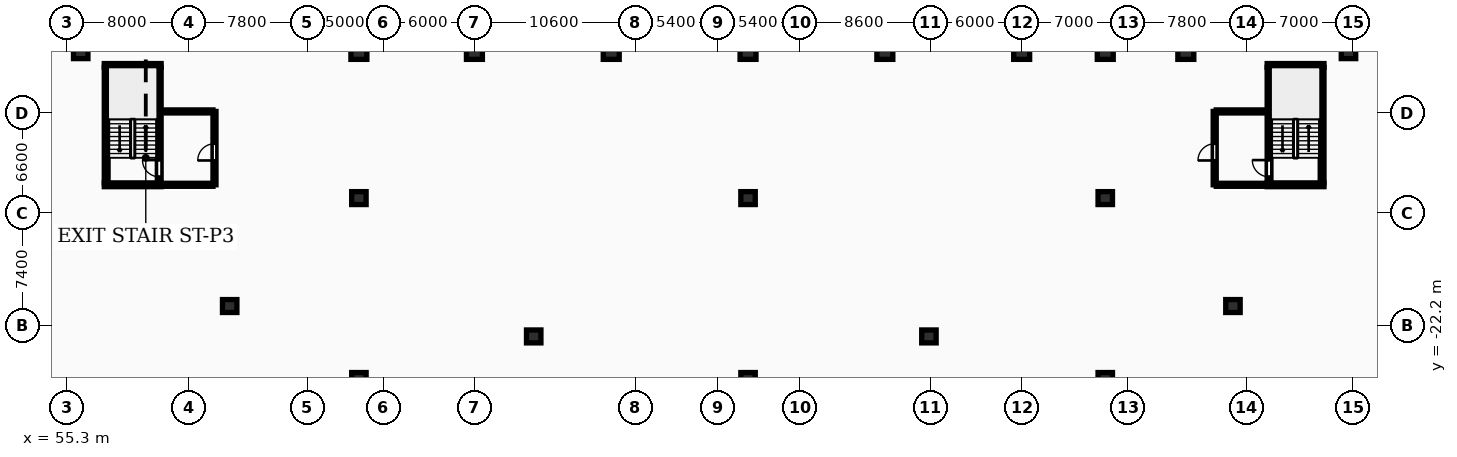
"""IFC4 building model, lengths in metres.
Left out: names, types, materials, properties, quantities, classifications, styles, units other than length and angle.
Written with IfcOpenShell. Run it as: python <this file> out.ifc"""

import sys

from ifc_helpers import new_model, si_unit, direction, frame, frame_2d, origin, origin_2d, place, context, subcontext, project, spatial, rectangle, extrude, element, fill, save


model = new_model("IFC4")
c1 = context("Model", 3, precision=1e-05, world=origin(), true_north=direction((0.0, 1.0)))
c2 = subcontext(c1, "Body", "Model", "MODEL_VIEW")
j1 = project(units=[si_unit("LENGTHUNIT", "METRE"), si_unit("PLANEANGLEUNIT", "RADIAN")], contexts=[c1])
p1 = place(None, origin())
s1 = spatial("IfcSite", under=j1, at=p1, CompositionType="ELEMENT")
p2 = place(p1, origin())
s2 = spatial("IfcBuilding", under=s1, at=p2, CompositionType="ELEMENT")
p3 = place(p2, frame((0.0, 0.0, -3.6)))
s3 = spatial("IfcBuildingStorey", under=s2, at=p3, CompositionType="ELEMENT", Elevation=-3.6)
for number, where, z_axis, x_axis in (
    (1, (74.5, -4.2, 0.0), (0.0, 0.0, 1.0), (1.0, 0.0, 0.0)),
    (2, (82.1, -4.2, 0.0), (0.0, 0.0, 1.0), (1.0, 0.0, 0.0)),
    (3, (91.1, -4.2, 0.0), (0.0, 0.0, 1.0), (1.0, 0.0, 0.0)),
    (4, (100.1, -4.2, 0.0), (0.0, 0.0, 1.0), (1.0, 0.0, 0.0)),
    (5, (109.1, -4.2, 0.0), (0.0, 0.0, 1.0), (1.0, 0.0, 0.0)),
    (6, (118.1, -4.2, 0.0), (0.0, 0.0, 1.0), (1.0, 0.0, 0.0)),
    (7, (123.6, -4.2, 0.0), (0.0, 0.0, 1.0), (1.0, 0.0, 0.0)),
    (8, (128.9, -4.2, 0.0), (0.0, 0.0, 1.0), (1.0, 0.0, 0.0)),
):
    element("IfcColumn", number, at=place(p3, frame(where, z_axis=z_axis, x_axis=x_axis)), inside=s3, PredefinedType="COLUMN", context=c2, shape_type="SweptSolid", body=[
        extrude(rectangle(XDim=1.05, YDim=0.95, at=origin_2d()), origin(), (0.0, 0.0, 1.0), 3.6),
    ])
for number, where, z_axis, x_axis in (
    (9, (56.2, -4.2, 0.0), (0.0, 0.0, 1.0), (1.0, 0.0, 0.0)),
    (10, (139.6, -4.2, 0.0), (0.0, 0.0, 1.0), (1.0, 0.0, 0.0)),
    (11, (74.5, -13.8, 0.0), (0.0, 0.0, 1.0), (1.0, 0.0, 0.0)),
    (12, (100.1, -13.8, 0.0), (0.0, 0.0, 1.0), (1.0, 0.0, 0.0)),
    (13, (123.6, -13.8, 0.0), (0.0, 0.0, 1.0), (1.0, 0.0, 0.0)),
    (14, (86.0, -22.9, 0.0), (0.0, 0.0, 1.0), (1.0, 0.0, 0.0)),
    (15, (112.0, -22.9, 0.0), (0.0, 0.0, 1.0), (1.0, 0.0, 0.0)),
    (16, (66.0, -20.9, 0.0), (0.0, 0.0, 1.0), (1.0, 0.0, 0.0)),
    (17, (132.0, -20.9, 0.0), (0.0, 0.0, 1.0), (1.0, 0.0, 0.0)),
    (18, (74.5, -25.7, 0.0), (0.0, 0.0, 1.0), (1.0, 0.0, 0.0)),
    (19, (100.1, -25.7, 0.0), (0.0, 0.0, 1.0), (1.0, 0.0, 0.0)),
    (20, (123.6, -25.7, 0.0), (0.0, 0.0, 1.0), (1.0, 0.0, 0.0)),
):
    element("IfcColumn", number, at=place(p3, frame(where, z_axis=z_axis, x_axis=x_axis)), inside=s3, PredefinedType="COLUMN", context=c2, shape_type="SweptSolid", body=[
        extrude(rectangle(XDim=0.95, YDim=0.85, at=origin_2d()), origin(), (0.0, 0.0, 1.0), 3.6),
    ])
p4 = place(p3, frame((57.875, -12.8, 0.0), z_axis=(0.0, 0.0, 1.0), x_axis=(0.0, 1.0, 0.0)))
e21 = element("IfcWall", 21, at=p4, inside=s3, PredefinedType="SHEAR", context=c2, shape_type="SweptSolid", body=[
    extrude(rectangle(XDim=7.6, YDim=0.25, at=frame_2d((3.8, 0.0))), origin(), (0.0, 0.0, 1.0), 3.6),
])
for number, where, z_axis, x_axis in (
    (22, (57.75, -12.925, 0.0), (0.0, 0.0, 1.0), (1.0, 0.0, 0.0)),
    (23, (57.75, -5.075, 0.0), (0.0, 0.0, 1.0), (1.0, 0.0, 0.0)),
):
    element("IfcWall", number, at=place(p3, frame(where, z_axis=z_axis, x_axis=x_axis)), inside=s3, PredefinedType="SHEAR", context=c2, shape_type="SweptSolid", body=[
        extrude(rectangle(XDim=3.74, YDim=0.25, at=frame_2d((1.87, 0.0))), origin(), (0.0, 0.0, 1.0), 3.6),
    ])
p5 = place(p3, frame((61.365, -12.8, 0.0), z_axis=(0.0, 0.0, 1.0), x_axis=(0.0, 1.0, 0.0)))
e24 = element("IfcWall", 24, at=p5, inside=s3, PredefinedType="SHEAR", context=c2, shape_type="SweptSolid", body=[
    extrude(rectangle(XDim=7.6, YDim=0.25, at=frame_2d((3.8, 0.0))), origin(), (0.0, 0.0, 1.0), 3.6),
])
p6 = place(p5, frame((0.4, 0.0, 0.0)))
e25 = element("IfcOpeningElement", 25, at=p6, cuts=e24, PredefinedType="OPENING", context=c2, shape_type="SweptSolid", body=[
    extrude(rectangle(XDim=1.1, YDim=2.1, at=frame_2d((0.55, 1.05))), frame((0.0, 0.135, 0.0), z_axis=(0.0, -1.0, 0.0), x_axis=(1.0, 0.0, 0.0)), (0.0, 0.0, 1.0), 0.27),
])
p7 = place(p3, frame((65.0, -12.925, 0.0), z_axis=(0.0, 0.0, 1.0), x_axis=(0.0, 1.0, 0.0)))
e26 = element("IfcWall", 26, at=p7, inside=s3, PredefinedType="PARTITIONING", context=c2, shape_type="SweptSolid", body=[
    extrude(rectangle(XDim=4.825, YDim=0.2, at=frame_2d((2.413, 0.0))), origin(), (0.0, 0.0, 1.0), 3.3),
])
p8 = place(p7, frame((1.6, 0.0, 0.0)))
e27 = element("IfcOpeningElement", 27, at=p8, cuts=e26, PredefinedType="OPENING", context=c2, shape_type="SweptSolid", body=[
    extrude(rectangle(XDim=1.1, YDim=2.15, at=frame_2d((0.55, 1.075))), frame((0.0, 0.11, 0.0), z_axis=(0.0, -1.0, 0.0), x_axis=(1.0, 0.0, 0.0)), (0.0, 0.0, 1.0), 0.22),
])
for number, where, z_axis, x_axis in (
    (28, (61.5, -12.925, 0.0), (0.0, 0.0, 1.0), (1.0, 0.0, 0.0)),
    (29, (61.5, -8.1, 0.0), (0.0, 0.0, 1.0), (1.0, 0.0, 0.0)),
):
    element("IfcWall", number, at=place(p3, frame(where, z_axis=z_axis, x_axis=x_axis)), inside=s3, PredefinedType="PARTITIONING", context=c2, shape_type="SweptSolid", body=[
        extrude(rectangle(XDim=3.4, YDim=0.2, at=frame_2d((1.7, 0.0))), origin(), (0.0, 0.0, 1.0), 3.3),
    ])
p9 = place(p3, frame((134.375, -12.8, 0.0), z_axis=(0.0, 0.0, 1.0), x_axis=(0.0, 1.0, 0.0)))
e30 = element("IfcWall", 30, at=p9, inside=s3, PredefinedType="SHEAR", context=c2, shape_type="SweptSolid", body=[
    extrude(rectangle(XDim=7.6, YDim=0.25, at=frame_2d((3.8, 0.0))), origin(), (0.0, 0.0, 1.0), 3.6),
])
p10 = place(p9, frame((0.4, 0.0, 0.0)))
e31 = element("IfcOpeningElement", 31, at=p10, cuts=e30, PredefinedType="OPENING", context=c2, shape_type="SweptSolid", body=[
    extrude(rectangle(XDim=1.1, YDim=2.1, at=frame_2d((0.55, 1.05))), frame((0.0, 0.135, 0.0), z_axis=(0.0, -1.0, 0.0), x_axis=(1.0, 0.0, 0.0)), (0.0, 0.0, 1.0), 0.27),
])
p11 = place(p3, frame((137.865, -12.8, 0.0), z_axis=(0.0, 0.0, 1.0), x_axis=(0.0, 1.0, 0.0)))
e32 = element("IfcWall", 32, at=p11, inside=s3, PredefinedType="SHEAR", context=c2, shape_type="SweptSolid", body=[
    extrude(rectangle(XDim=7.6, YDim=0.25, at=frame_2d((3.8, 0.0))), origin(), (0.0, 0.0, 1.0), 3.6),
])
for number, where, z_axis, x_axis in (
    (33, (134.25, -12.925, 0.0), (0.0, 0.0, 1.0), (1.0, 0.0, 0.0)),
    (34, (134.25, -5.075, 0.0), (0.0, 0.0, 1.0), (1.0, 0.0, 0.0)),
):
    element("IfcWall", number, at=place(p3, frame(where, z_axis=z_axis, x_axis=x_axis)), inside=s3, PredefinedType="SHEAR", context=c2, shape_type="SweptSolid", body=[
        extrude(rectangle(XDim=3.74, YDim=0.25, at=frame_2d((1.87, 0.0))), origin(), (0.0, 0.0, 1.0), 3.6),
    ])
p12 = place(p3, frame((130.8, -12.925, 0.0), z_axis=(0.0, 0.0, 1.0), x_axis=(0.0, 1.0, 0.0)))
e35 = element("IfcWall", 35, at=p12, inside=s3, PredefinedType="PARTITIONING", context=c2, shape_type="SweptSolid", body=[
    extrude(rectangle(XDim=4.825, YDim=0.2, at=frame_2d((2.413, 0.0))), origin(), (0.0, 0.0, 1.0), 3.3),
])
p13 = place(p12, frame((1.6, 0.0, 0.0)))
e36 = element("IfcOpeningElement", 36, at=p13, cuts=e35, PredefinedType="OPENING", context=c2, shape_type="SweptSolid", body=[
    extrude(rectangle(XDim=1.1, YDim=2.15, at=frame_2d((0.55, 1.075))), frame((0.0, 0.11, 0.0), z_axis=(0.0, -1.0, 0.0), x_axis=(1.0, 0.0, 0.0)), (0.0, 0.0, 1.0), 0.22),
])
for number, where, z_axis, x_axis in (
    (37, (130.9, -12.925, 0.0), (0.0, 0.0, 1.0), (1.0, 0.0, 0.0)),
    (38, (130.9, -8.1, 0.0), (0.0, 0.0, 1.0), (1.0, 0.0, 0.0)),
):
    element("IfcWall", number, at=place(p3, frame(where, z_axis=z_axis, x_axis=x_axis)), inside=s3, PredefinedType="PARTITIONING", context=c2, shape_type="SweptSolid", body=[
        extrude(rectangle(XDim=3.35, YDim=0.2, at=frame_2d((1.675, 0.0))), origin(), (0.0, 0.0, 1.0), 3.3),
    ])
p14 = place(p6, origin())
e39 = element("IfcDoor", 39, at=p14, inside=s3, OperationType="SINGLE_SWING_RIGHT", PredefinedType="DOOR", context=c2, shape_type="SweptSolid", body=[
    extrude(rectangle(XDim=1.1, YDim=2.1, at=frame_2d((0.55, 1.05))), frame((0.0, 0.025, 0.0), z_axis=(0.0, -1.0, 0.0), x_axis=(1.0, 0.0, 0.0)), (0.0, 0.0, 1.0), 0.05),
])
fill(e25, e39)
p15 = place(p8, origin())
e40 = element("IfcDoor", 40, at=p15, inside=s3, OperationType="SINGLE_SWING_LEFT", PredefinedType="DOOR", context=c2, shape_type="SweptSolid", body=[
    extrude(rectangle(XDim=1.1, YDim=2.15, at=frame_2d((0.55, 1.075))), frame((0.0, 0.025, 0.0), z_axis=(0.0, -1.0, 0.0), x_axis=(1.0, 0.0, 0.0)), (0.0, 0.0, 1.0), 0.05),
])
fill(e27, e40)
p16 = place(p10, origin())
e41 = element("IfcDoor", 41, at=p16, inside=s3, OperationType="SINGLE_SWING_RIGHT", PredefinedType="DOOR", context=c2, shape_type="SweptSolid", body=[
    extrude(rectangle(XDim=1.1, YDim=2.1, at=frame_2d((0.55, 1.05))), frame((0.0, 0.025, 0.0), z_axis=(0.0, -1.0, 0.0), x_axis=(1.0, 0.0, 0.0)), (0.0, 0.0, 1.0), 0.05),
])
fill(e31, e41)
p17 = place(p13, origin())
e42 = element("IfcDoor", 42, at=p17, inside=s3, OperationType="SINGLE_SWING_LEFT", PredefinedType="DOOR", context=c2, shape_type="SweptSolid", body=[
    extrude(rectangle(XDim=1.1, YDim=2.15, at=frame_2d((0.55, 1.075))), frame((0.0, 0.025, 0.0), z_axis=(0.0, -1.0, 0.0), x_axis=(1.0, 0.0, 0.0)), (0.0, 0.0, 1.0), 0.05),
])
fill(e36, e42)
save(model, sys.argv[1])
